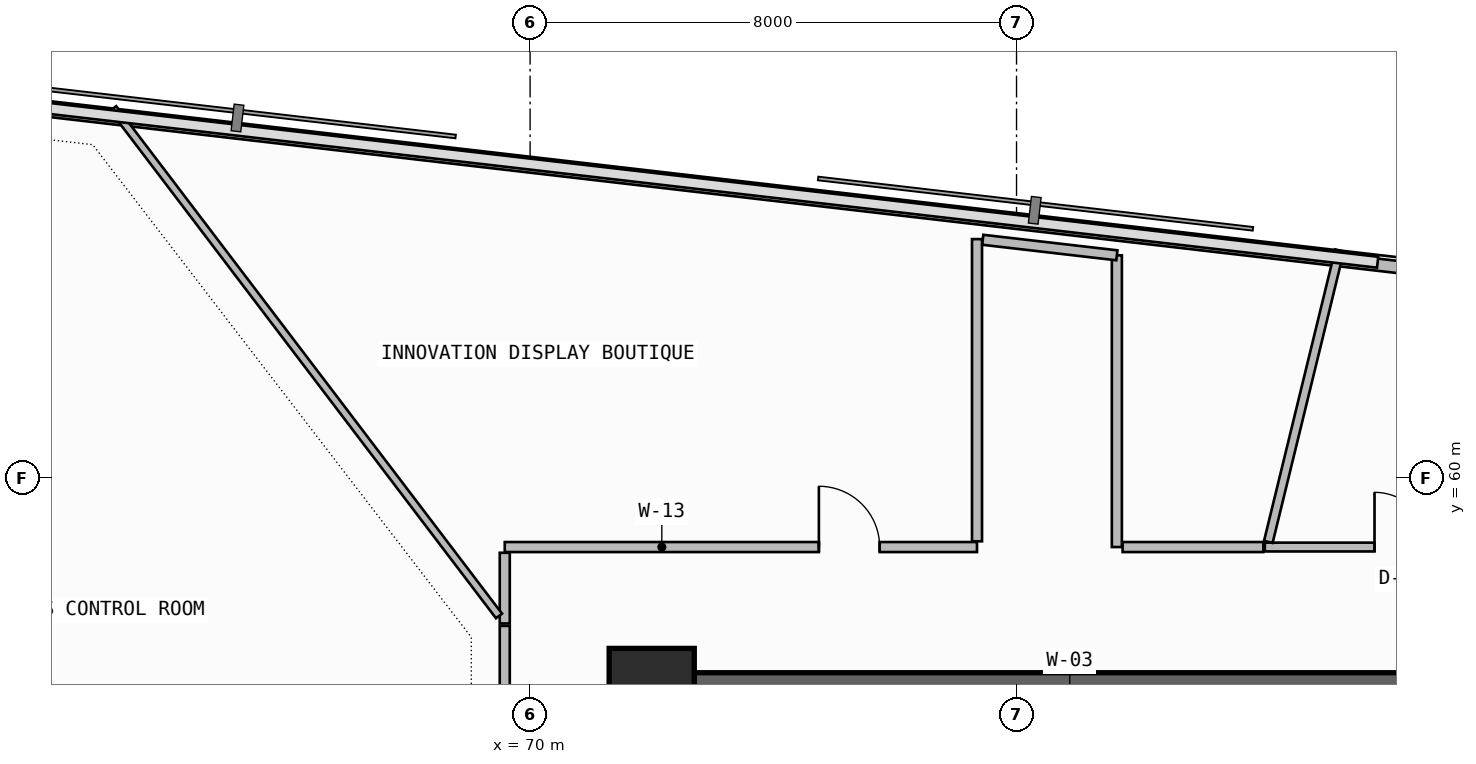
"""IFC4 building model, lengths in metres.
Left out: names, types, materials, properties, quantities, classifications, styles, units other than length and angle.
Written with IfcOpenShell. Run it as: python <this file> out.ifc"""

import sys

from ifc_helpers import new_model, si_unit, direction, frame, frame_2d, origin, origin_2d, place, context, subcontext, project, spatial, rectangle, extrude, element, fill, save


model = new_model("IFC4")
c1 = context("Model", 3, precision=1e-05, world=origin(), true_north=direction((0.0, 1.0)))
c2 = subcontext(c1, "Body", "Model", "MODEL_VIEW")
j1 = project(units=[si_unit("LENGTHUNIT", "METRE"), si_unit("PLANEANGLEUNIT", "RADIAN")], contexts=[c1])
p1 = place(None, origin())
s1 = spatial("IfcSite", under=j1, at=p1, CompositionType="ELEMENT")
p2 = place(p1, origin())
s2 = spatial("IfcBuilding", under=s1, at=p2, CompositionType="ELEMENT")
p3 = place(p2, frame((0.0, 0.0, 204.42)))
s3 = spatial("IfcBuildingStorey", under=s2, at=p3, CompositionType="ELEMENT", Elevation=204.42)
p4 = place(p3, frame((72.0, 56.425, -0.26), z_axis=(0.0, 0.0, 1.0), x_axis=(1.0, 0.0, 0.0)))
e1 = element("IfcWall", 1, at=p4, inside=s3, PredefinedType="SHEAR", context=c2, shape_type="SweptSolid", body=[
    extrude(rectangle(XDim=13.75, YDim=0.75, at=frame_2d((6.875, 0.0))), origin(), (0.0, 0.0, 1.0), 3.52),
])
p5 = place(p3, frame((72.0, 56.5, 0.0), z_axis=(0.0, 0.0, 1.0), x_axis=(1.0, 0.0, 0.0)))
e2 = element("IfcColumn", 2, at=p5, inside=s3, PredefinedType="COLUMN", context=c2, shape_type="SweptSolid", body=[
    extrude(rectangle(XDim=1.4, YDim=1.4, at=origin_2d()), origin(), (0.0, 0.0, 1.0), 3.52),
])
p6 = place(p3, frame((55.325, 59.57, -0.26), z_axis=(0.0, 0.0, 1.0), x_axis=(0.496211351597, -0.868201759124, 0.0)))
e3 = element("IfcWall", 3, at=p6, inside=s3, PredefinedType="SHEAR", context=c2, shape_type="SweptSolid", body=[
    extrude(rectangle(XDim=19.243, YDim=0.55, at=frame_2d((9.622, 0.0))), origin(), (0.0, 0.0, 1.0), 3.52),
])
p7 = place(p6, frame((14.757, 0.0, 1.1)))
e4 = element("IfcOpeningElement", 4, at=p7, cuts=e3, PredefinedType="OPENING", context=c2, shape_type="SweptSolid", body=[
    extrude(rectangle(XDim=2.4, YDim=1.2, at=frame_2d((1.2, 0.6))), frame((0.0, 0.285, 0.0), z_axis=(0.0, -1.0, 0.0), x_axis=(1.0, 0.0, 0.0)), (0.0, 0.0, 1.0), 0.57),
])
p8 = place(p3, frame((85.424, 63.338, 0.0), z_axis=(0.0, 0.0, 1.0), x_axis=(-0.993364714048, 0.115006716693, 0.0)))
e5 = element("IfcWall", 5, at=p8, inside=s3, PredefinedType="PARAPET", context=c2, shape_type="SweptSolid", body=[
    extrude(rectangle(XDim=26.302, YDim=0.2, at=frame_2d((13.151, 0.0))), origin(), (0.0, 0.0, 1.0), 1.15),
])
p9 = place(p3, frame((87.967, 58.867, 0.0), z_axis=(0.0, 0.0, 1.0), x_axis=(-1.0, 0.0, 0.0)))
e6 = element("IfcWall", 6, at=p9, inside=s3, PredefinedType="PARTITIONING", context=c2, shape_type="SweptSolid", body=[
    extrude(rectangle(XDim=5.884, YDim=0.145, at=frame_2d((2.942, 0.0))), origin(), (0.0, 0.0, 1.0), 2.745),
])
p10 = place(p9, frame((3.179, 0.0, 0.0)))
e7 = element("IfcOpeningElement", 7, at=p10, cuts=e6, PredefinedType="OPENING", context=c2, shape_type="SweptSolid", body=[
    extrude(rectangle(XDim=0.9, YDim=2.1, at=frame_2d((0.45, 1.05))), frame((0.0, 0.083, 0.0), z_axis=(0.0, -1.0, 0.0), x_axis=(1.0, 0.0, 0.0)), (0.0, 0.0, 1.0), 0.165),
])
p11 = place(p3, frame((82.141, 58.951, 0.0), z_axis=(0.0, 0.0, 1.0), x_axis=(0.237338941626, 0.971426902442, 0.0)))
e8 = element("IfcWall", 8, at=p11, inside=s3, PredefinedType="PARTITIONING", context=c2, shape_type="SweptSolid", body=[
    extrude(rectangle(XDim=4.933, YDim=0.145, at=frame_2d((2.467, 0.0))), origin(), (0.0, 0.0, 1.0), 3.26),
])
p12 = place(p3, frame((77.35, 58.867, 0.0), z_axis=(0.0, 0.0, 1.0), x_axis=(-1.0, 0.0, 0.0)))
e9 = element("IfcWall", 9, at=p12, inside=s3, PredefinedType="PARTITIONING", context=c2, shape_type="SweptSolid", body=[
    extrude(rectangle(XDim=7.767, YDim=0.165, at=frame_2d((3.883, 0.0))), origin(), (0.0, 0.0, 1.0), 3.26),
])
p13 = place(p12, frame((1.601, 0.0, 0.0)))
e10 = element("IfcOpeningElement", 10, at=p13, cuts=e9, PredefinedType="OPENING", context=c2, shape_type="SweptSolid", body=[
    extrude(rectangle(XDim=1.0, YDim=2.2, at=frame_2d((0.5, 1.1))), frame((0.0, 0.093, 0.0), z_axis=(0.0, -1.0, 0.0), x_axis=(1.0, 0.0, 0.0)), (0.0, 0.0, 1.0), 0.185),
])
p14 = place(p3, frame((77.35, 63.931, 0.0), z_axis=(0.0, 0.0, 1.0), x_axis=(0.0, -1.0, 0.0)))
e11 = element("IfcWall", 11, at=p14, inside=s3, PredefinedType="PARTITIONING", context=c2, shape_type="SweptSolid", body=[
    extrude(rectangle(XDim=4.97, YDim=0.165, at=frame_2d((2.485, 0.0))), origin(), (0.0, 0.0, 1.0), 3.26),
])
p15 = place(p3, frame((79.65, 58.867, 0.0), z_axis=(0.0, 0.0, 1.0), x_axis=(0.0, 1.0, 0.0)))
e12 = element("IfcWall", 12, at=p15, inside=s3, PredefinedType="PARTITIONING", context=c2, shape_type="SweptSolid", body=[
    extrude(rectangle(XDim=4.798, YDim=0.165, at=frame_2d((2.399, 0.0))), origin(), (0.0, 0.0, 1.0), 3.26),
])
p16 = place(p3, frame((82.059, 58.867, 0.0), z_axis=(0.0, 0.0, 1.0), x_axis=(-1.0, 0.0, 0.0)))
e13 = element("IfcWall", 13, at=p16, inside=s3, PredefinedType="PARTITIONING", context=c2, shape_type="SweptSolid", body=[
    extrude(rectangle(XDim=2.314, YDim=0.165, at=frame_2d((1.157, 0.0))), origin(), (0.0, 0.0, 1.0), 3.26),
])
p17 = place(p3, frame((79.65, 63.665, 0.0), z_axis=(0.0, 0.0, 1.0), x_axis=(-0.993362136032, 0.115028981987, 0.0)))
e14 = element("IfcWall", 14, at=p17, inside=s3, PredefinedType="PARTITIONING", context=c2, shape_type="SweptSolid", body=[
    extrude(rectangle(XDim=2.22, YDim=0.165, at=frame_2d((1.11, 0.0))), origin(), (0.0, 0.0, 1.0), 3.26),
])
p18 = place(p3, frame((69.583, 58.772, 0.0), z_axis=(0.0, 0.0, 1.0), x_axis=(0.0, -1.0, 0.0)))
e15 = element("IfcWall", 15, at=p18, inside=s3, PredefinedType="PARTITIONING", context=c2, shape_type="SweptSolid", body=[
    extrude(rectangle(XDim=1.163, YDim=0.165, at=frame_2d((0.581, 0.0))), origin(), (0.0, 0.0, 1.0), 2.745),
])
p19 = place(p3, frame((69.489, 57.734, 0.0), z_axis=(0.0, 0.0, 1.0), x_axis=(-0.605299937373, 0.795997478524, 0.0)))
e16 = element("IfcWall", 16, at=p19, inside=s3, PredefinedType="PARTITIONING", context=c2, shape_type="SweptSolid", body=[
    extrude(rectangle(XDim=10.484, YDim=0.125, at=frame_2d((5.242, 0.0))), origin(), (0.0, 0.0, 1.0), 2.745),
])
p20 = place(p3, frame((69.583, 57.57, 0.0), z_axis=(0.0, 0.0, 1.0), x_axis=(0.0, -1.0, 0.0)))
e17 = element("IfcWall", 17, at=p20, inside=s3, PredefinedType="PARTITIONING", context=c2, shape_type="SweptSolid", body=[
    extrude(rectangle(XDim=8.594, YDim=0.165, at=frame_2d((4.297, 0.0))), origin(), (0.0, 0.0, 1.0), 2.745),
])
p21 = place(p20, frame((2.718, 0.0, 0.0)))
e18 = element("IfcOpeningElement", 18, at=p21, cuts=e17, PredefinedType="OPENING", context=c2, shape_type="SweptSolid", body=[
    extrude(rectangle(XDim=1.0, YDim=2.2, at=frame_2d((0.5, 1.1))), frame((0.0, 0.093, 0.0), z_axis=(0.0, -1.0, 0.0), x_axis=(1.0, 0.0, 0.0)), (0.0, 0.0, 1.0), 0.185),
])
p22 = place(p10, frame((0.9, 0.0, 0.0), z_axis=(0.0, 0.0, 1.0), x_axis=(-1.0, 0.0, 0.0)))
e19 = element("IfcDoor", 19, at=p22, inside=s3, OperationType="SINGLE_SWING_LEFT", PredefinedType="DOOR", context=c2, shape_type="SweptSolid", body=[
    extrude(rectangle(XDim=0.9, YDim=2.1, at=frame_2d((0.45, 1.05))), frame((0.0, 0.025, 0.0), z_axis=(0.0, -1.0, 0.0), x_axis=(1.0, 0.0, 0.0)), (0.0, 0.0, 1.0), 0.05),
])
fill(e7, e19)
p23 = place(p13, frame((1.0, 0.0, 0.0), z_axis=(0.0, 0.0, 1.0), x_axis=(-1.0, 0.0, 0.0)))
e20 = element("IfcDoor", 20, at=p23, inside=s3, OperationType="SINGLE_SWING_LEFT", PredefinedType="DOOR", context=c2, shape_type="SweptSolid", body=[
    extrude(rectangle(XDim=1.0, YDim=2.2, at=frame_2d((0.5, 1.1))), frame((0.0, 0.025, 0.0), z_axis=(0.0, -1.0, 0.0), x_axis=(1.0, 0.0, 0.0)), (0.0, 0.0, 1.0), 0.05),
])
fill(e10, e20)
save(model, sys.argv[1])
